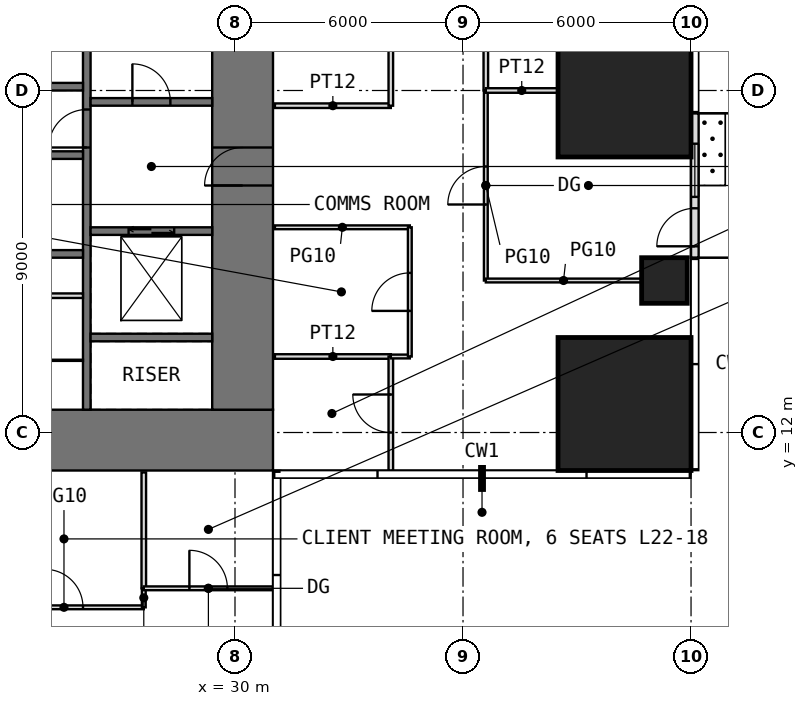
"""IFC4 building model, lengths in metres.
Left out: names, types, materials, properties, quantities, classifications, styles, units other than length and angle.
Written with IfcOpenShell. Run it as: python <this file> out.ifc"""

import sys

from ifc_helpers import new_model, si_unit, direction, frame, frame_2d, origin, origin_2d, place, context, subcontext, project, spatial, rectangle, extrude, element, fill, save


model = new_model("IFC4")
c1 = context("Model", 3, precision=1e-05, world=origin(), true_north=direction((0.0, 1.0)))
c2 = subcontext(c1, "Body", "Model", "MODEL_VIEW")
j1 = project(units=[si_unit("LENGTHUNIT", "METRE"), si_unit("PLANEANGLEUNIT", "RADIAN")], contexts=[c1])
p1 = place(None, origin())
s1 = spatial("IfcSite", under=j1, at=p1, CompositionType="ELEMENT")
p2 = place(p1, origin())
s2 = spatial("IfcBuilding", under=s1, at=p2, CompositionType="ELEMENT")
p3 = place(p2, frame((0.0, 0.0, 96.5)))
s3 = spatial("IfcBuildingStorey", under=s2, at=p3, CompositionType="ELEMENT", Elevation=96.5)
p4 = place(p3, frame((40.25, 12.75, 0.0), z_axis=(0.0, 0.0, 1.0), x_axis=(1.0, 0.0, 0.0)))
e1 = element("IfcColumn", 1, at=p4, inside=s3, PredefinedType="COLUMN", context=c2, shape_type="SweptSolid", body=[
    extrude(rectangle(XDim=3.5, YDim=3.5, at=origin_2d()), origin(), (0.0, 0.0, 1.0), 4.0),
])
p5 = place(p3, frame((41.3, 16.0, 0.0), z_axis=(0.0, 0.0, 1.0), x_axis=(1.0, 0.0, 0.0)))
e2 = element("IfcColumn", 2, at=p5, inside=s3, PredefinedType="COLUMN", context=c2, shape_type="SweptSolid", body=[
    extrude(rectangle(XDim=1.2, YDim=1.2, at=origin_2d()), origin(), (0.0, 0.0, 1.0), 4.0),
])
p6 = place(p3, frame((40.25, 21.0, 0.0), z_axis=(0.0, 0.0, 1.0), x_axis=(1.0, 0.0, 0.0)))
e3 = element("IfcColumn", 3, at=p6, inside=s3, PredefinedType="COLUMN", context=c2, shape_type="SweptSolid", body=[
    extrude(rectangle(XDim=3.5, YDim=3.5, at=origin_2d()), origin(), (0.0, 0.0, 1.0), 4.0),
])
p7 = place(p3, frame((42.1, 16.6, 0.0), z_axis=(0.0, 0.0, 1.0), x_axis=(0.0, 1.0, 0.0)))
e4 = element("IfcWall", 4, at=p7, inside=s3, PredefinedType="USERDEFINED", context=c2, shape_type="SweptSolid", body=[
    extrude(rectangle(XDim=3.8, YDim=0.2, at=frame_2d((1.9, 0.0))), origin(), (0.0, 0.0, 1.0), 3.75),
])
p8 = place(p7, frame((0.3, 0.0, 0.0)))
e5 = element("IfcOpeningElement", 5, at=p8, cuts=e4, PredefinedType="OPENING", context=c2, shape_type="SweptSolid", body=[
    extrude(rectangle(XDim=1.0, YDim=2.4, at=frame_2d((0.5, 1.2))), frame((0.0, 0.11, 0.0), z_axis=(0.0, -1.0, 0.0), x_axis=(1.0, 0.0, 0.0)), (0.0, 0.0, 1.0), 0.22),
])
p9 = place(p7, frame((1.6, 0.0, 0.3)))
e6 = element("IfcOpeningElement", 6, at=p9, cuts=e4, PredefinedType="OPENING", context=c2, shape_type="SweptSolid", body=[
    extrude(rectangle(XDim=1.4, YDim=2.7, at=frame_2d((0.7, 1.35))), frame((0.0, 0.11, 0.0), z_axis=(0.0, -1.0, 0.0), x_axis=(1.0, 0.0, 0.0)), (0.0, 0.0, 1.0), 0.22),
])
p10 = place(p3, frame((11.0, 11.8, -0.05), z_axis=(0.0, 0.0, 1.0), x_axis=(1.0, 0.0, 0.0)))
e7 = element("IfcWall", 7, at=p10, inside=s3, PredefinedType="SHEAR", context=c2, shape_type="SweptSolid", body=[
    extrude(rectangle(XDim=20.0, YDim=1.6, at=frame_2d((10.0, 0.0))), origin(), (0.0, 0.0, 1.0), 4.0),
])
p11 = place(p10, frame((9.0, 0.0, 0.05)))
e8 = element("IfcOpeningElement", 8, at=p11, cuts=e7, PredefinedType="OPENING", context=c2, shape_type="SweptSolid", body=[
    extrude(rectangle(XDim=2.0, YDim=2.2, at=frame_2d((1.0, 1.1))), frame((0.0, 0.81, 0.0), z_axis=(0.0, -1.0, 0.0), x_axis=(1.0, 0.0, 0.0)), (0.0, 0.0, 1.0), 1.62),
])
p12 = place(p3, frame((30.2, 12.6, -0.05), z_axis=(0.0, 0.0, 1.0), x_axis=(0.0, 1.0, 0.0)))
e9 = element("IfcWall", 9, at=p12, inside=s3, PredefinedType="SHEAR", context=c2, shape_type="SweptSolid", body=[
    extrude(rectangle(XDim=16.8, YDim=1.6, at=frame_2d((8.4, 0.0))), origin(), (0.0, 0.0, 1.0), 4.0),
])
p13 = place(p12, frame((5.9, 0.0, 0.05)))
e10 = element("IfcOpeningElement", 10, at=p13, cuts=e9, PredefinedType="OPENING", context=c2, shape_type="SweptSolid", body=[
    extrude(rectangle(XDim=1.0, YDim=2.2, at=frame_2d((0.5, 1.1))), frame((0.0, 0.81, 0.0), z_axis=(0.0, -1.0, 0.0), x_axis=(1.0, 0.0, 0.0)), (0.0, 0.0, 1.0), 1.62),
])
p14 = place(p3, frame((26.1, 12.6, -0.05), z_axis=(0.0, 0.0, 1.0), x_axis=(0.0, 1.0, 0.0)))
e11 = element("IfcWall", 11, at=p14, inside=s3, PredefinedType="SHEAR", context=c2, shape_type="SweptSolid", body=[
    extrude(rectangle(XDim=16.8, YDim=0.2, at=frame_2d((8.4, 0.0))), origin(), (0.0, 0.0, 1.0), 4.0),
])
p15 = place(p14, frame((6.9, 0.0, 0.05)))
e12 = element("IfcOpeningElement", 12, at=p15, cuts=e11, PredefinedType="OPENING", context=c2, shape_type="SweptSolid", body=[
    extrude(rectangle(XDim=1.0, YDim=2.2, at=frame_2d((0.5, 1.1))), frame((0.0, 0.11, 0.0), z_axis=(0.0, -1.0, 0.0), x_axis=(1.0, 0.0, 0.0)), (0.0, 0.0, 1.0), 0.22),
])
for number, where, z_axis, x_axis in (
    (13, (22.8, 16.7, -0.05), (0.0, 0.0, 1.0), (1.0, 0.0, 0.0)),
    (14, (22.8, 19.3, -0.05), (0.0, 0.0, 1.0), (1.0, 0.0, 0.0)),
    (15, (22.8, 21.1, -0.05), (0.0, 0.0, 1.0), (1.0, 0.0, 0.0)),
    (16, (26.2, 14.5, -0.05), (0.0, 0.0, 1.0), (1.0, 0.0, 0.0)),
):
    element("IfcWall", number, at=place(p3, frame(where, z_axis=z_axis, x_axis=x_axis)), inside=s3, PredefinedType="SHEAR", context=c2, shape_type="SweptSolid", body=[
        extrude(rectangle(XDim=3.2, YDim=0.2, at=frame_2d((1.6, 0.0))), origin(), (0.0, 0.0, 1.0), 4.0),
    ])
p16 = place(p3, frame((26.2, 17.3, -0.05), z_axis=(0.0, 0.0, 1.0), x_axis=(1.0, 0.0, 0.0)))
e17 = element("IfcWall", 17, at=p16, inside=s3, PredefinedType="SHEAR", context=c2, shape_type="SweptSolid", body=[
    extrude(rectangle(XDim=3.2, YDim=0.2, at=frame_2d((1.6, 0.0))), origin(), (0.0, 0.0, 1.0), 4.0),
])
p17 = place(p16, frame((1.0, 0.0, 0.05)))
e18 = element("IfcOpeningElement", 18, at=p17, cuts=e17, PredefinedType="OPENING", context=c2, shape_type="SweptSolid", body=[
    extrude(rectangle(XDim=1.2, YDim=2.2, at=frame_2d((0.6, 1.1))), frame((0.0, 0.11, 0.0), z_axis=(0.0, -1.0, 0.0), x_axis=(1.0, 0.0, 0.0)), (0.0, 0.0, 1.0), 0.22),
])
p18 = place(p3, frame((26.2, 20.7, -0.05), z_axis=(0.0, 0.0, 1.0), x_axis=(1.0, 0.0, 0.0)))
e19 = element("IfcWall", 19, at=p18, inside=s3, PredefinedType="SHEAR", context=c2, shape_type="SweptSolid", body=[
    extrude(rectangle(XDim=3.2, YDim=0.2, at=frame_2d((1.6, 0.0))), origin(), (0.0, 0.0, 1.0), 4.0),
])
p19 = place(p18, frame((1.1, 0.0, 0.05)))
e20 = element("IfcOpeningElement", 20, at=p19, cuts=e19, PredefinedType="OPENING", context=c2, shape_type="SweptSolid", body=[
    extrude(rectangle(XDim=1.0, YDim=2.2, at=frame_2d((0.5, 1.1))), frame((0.0, 0.11, 0.0), z_axis=(0.0, -1.0, 0.0), x_axis=(1.0, 0.0, 0.0)), (0.0, 0.0, 1.0), 0.22),
])
p20 = place(p3, frame((22.8, 15.6, 0.0), z_axis=(0.0, 0.0, 1.0), x_axis=(1.0, 0.0, 0.0)))
e21 = element("IfcWall", 21, at=p20, inside=s3, PredefinedType="PARTITIONING", context=c2, shape_type="SweptSolid", body=[
    extrude(rectangle(XDim=3.2, YDim=0.12, at=frame_2d((1.6, 0.0))), origin(), (0.0, 0.0, 1.0), 3.75),
])
p21 = place(p3, frame((24.6, 13.9, 0.0), z_axis=(0.0, 0.0, 1.0), x_axis=(1.0, 0.0, 0.0)))
e22 = element("IfcWall", 22, at=p21, inside=s3, PredefinedType="PARTITIONING", context=c2, shape_type="SweptSolid", body=[
    extrude(rectangle(XDim=1.4, YDim=0.03, at=frame_2d((0.7, 0.0))), origin(), (0.0, 0.0, 1.0), 3.75),
])
p22 = place(p3, frame((23.4, 7.4, 0.0), z_axis=(0.0, 0.0, 1.0), x_axis=(1.0, 0.0, 0.0)))
e23 = element("IfcWall", 23, at=p22, inside=s3, PredefinedType="PARTITIONING", context=c2, shape_type="SweptSolid", body=[
    extrude(rectangle(XDim=4.2, YDim=0.1, at=frame_2d((2.1, 0.0))), origin(), (0.0, 0.0, 1.0), 3.75),
])
p23 = place(p22, frame((1.6, 0.0, 0.0)))
e24 = element("IfcOpeningElement", 24, at=p23, cuts=e23, PredefinedType="OPENING", context=c2, shape_type="SweptSolid", body=[
    extrude(rectangle(XDim=1.0, YDim=2.4, at=frame_2d((0.5, 1.2))), frame((0.0, 0.06, 0.0), z_axis=(0.0, -1.0, 0.0), x_axis=(1.0, 0.0, 0.0)), (0.0, 0.0, 1.0), 0.12),
])
p24 = place(p3, frame((27.6, 7.4, 0.0), z_axis=(0.0, 0.0, 1.0), x_axis=(0.0, 1.0, 0.0)))
e25 = element("IfcWall", 25, at=p24, inside=s3, PredefinedType="PARTITIONING", context=c2, shape_type="SweptSolid", body=[
    extrude(rectangle(XDim=0.5, YDim=0.1, at=frame_2d((0.25, 0.0))), origin(), (0.0, 0.0, 1.0), 3.75),
])
p25 = place(p3, frame((27.6, 7.9, 0.0), z_axis=(0.0, 0.0, 1.0), x_axis=(0.0, 1.0, 0.0)))
e26 = element("IfcWall", 26, at=p25, inside=s3, PredefinedType="PARTITIONING", context=c2, shape_type="SweptSolid", body=[
    extrude(rectangle(XDim=3.05, YDim=0.12, at=frame_2d((1.525, 0.0))), origin(), (0.0, 0.0, 1.0), 3.75),
])
p26 = place(p3, frame((27.6, 7.9, 0.0), z_axis=(0.0, 0.0, 1.0), x_axis=(1.0, 0.0, 0.0)))
e27 = element("IfcWall", 27, at=p26, inside=s3, PredefinedType="PARTITIONING", context=c2, shape_type="SweptSolid", body=[
    extrude(rectangle(XDim=3.4, YDim=0.1, at=frame_2d((1.7, 0.0))), origin(), (0.0, 0.0, 1.0), 3.75),
])
p27 = place(p26, frame((1.2, 0.0, 0.0)))
e28 = element("IfcOpeningElement", 28, at=p27, cuts=e27, PredefinedType="OPENING", context=c2, shape_type="SweptSolid", body=[
    extrude(rectangle(XDim=1.0, YDim=2.4, at=frame_2d((0.5, 1.2))), frame((0.0, 0.06, 0.0), z_axis=(0.0, -1.0, 0.0), x_axis=(1.0, 0.0, 0.0)), (0.0, 0.0, 1.0), 0.12),
])
p28 = place(p3, frame((31.05, 14.0, 0.0), z_axis=(0.0, 0.0, 1.0), x_axis=(1.0, 0.0, 0.0)))
e29 = element("IfcWall", 29, at=p28, inside=s3, PredefinedType="PARTITIONING", context=c2, shape_type="SweptSolid", body=[
    extrude(rectangle(XDim=3.05, YDim=0.12, at=frame_2d((1.525, 0.0))), origin(), (0.0, 0.0, 1.0), 3.75),
])
p29 = place(p3, frame((31.05, 17.4, 0.0), z_axis=(0.0, 0.0, 1.0), x_axis=(1.0, 0.0, 0.0)))
e30 = element("IfcWall", 30, at=p29, inside=s3, PredefinedType="PARTITIONING", context=c2, shape_type="SweptSolid", body=[
    extrude(rectangle(XDim=3.55, YDim=0.1, at=frame_2d((1.775, 0.0))), origin(), (0.0, 0.0, 1.0), 3.75),
])
p30 = place(p3, frame((31.05, 20.6, 0.0), z_axis=(0.0, 0.0, 1.0), x_axis=(1.0, 0.0, 0.0)))
e31 = element("IfcWall", 31, at=p30, inside=s3, PredefinedType="PARTITIONING", context=c2, shape_type="SweptSolid", body=[
    extrude(rectangle(XDim=3.05, YDim=0.12, at=frame_2d((1.525, 0.0))), origin(), (0.0, 0.0, 1.0), 3.75),
])
p31 = place(p3, frame((34.1, 11.0, 0.0), z_axis=(0.0, 0.0, 1.0), x_axis=(0.0, 1.0, 0.0)))
e32 = element("IfcWall", 32, at=p31, inside=s3, PredefinedType="PARTITIONING", context=c2, shape_type="SweptSolid", body=[
    extrude(rectangle(XDim=3.0, YDim=0.12, at=frame_2d((1.5, 0.0))), origin(), (0.0, 0.0, 1.0), 3.75),
])
p32 = place(p31, frame((1.0, 0.0, 0.0)))
e33 = element("IfcOpeningElement", 33, at=p32, cuts=e32, PredefinedType="OPENING", context=c2, shape_type="SweptSolid", body=[
    extrude(rectangle(XDim=1.0, YDim=2.2, at=frame_2d((0.5, 1.1))), frame((0.0, 0.07, 0.0), z_axis=(0.0, -1.0, 0.0), x_axis=(1.0, 0.0, 0.0)), (0.0, 0.0, 1.0), 0.14),
])
p33 = place(p3, frame((34.1, 14.0, 0.0), z_axis=(0.0, 0.0, 1.0), x_axis=(1.0, 0.0, 0.0)))
e34 = element("IfcWall", 34, at=p33, inside=s3, PredefinedType="PARTITIONING", context=c2, shape_type="SweptSolid", body=[
    extrude(rectangle(XDim=0.5, YDim=0.1, at=frame_2d((0.25, 0.0))), origin(), (0.0, 0.0, 1.0), 3.75),
])
p34 = place(p3, frame((34.1, 20.6, 0.0), z_axis=(0.0, 0.0, 1.0), x_axis=(0.0, 1.0, 0.0)))
e35 = element("IfcWall", 35, at=p34, inside=s3, PredefinedType="PARTITIONING", context=c2, shape_type="SweptSolid", body=[
    extrude(rectangle(XDim=5.2, YDim=0.12, at=frame_2d((2.6, 0.0))), origin(), (0.0, 0.0, 1.0), 3.75),
])
p35 = place(p34, frame((2.1, 0.0, 0.0)))
e36 = element("IfcOpeningElement", 36, at=p35, cuts=e35, PredefinedType="OPENING", context=c2, shape_type="SweptSolid", body=[
    extrude(rectangle(XDim=1.0, YDim=2.2, at=frame_2d((0.5, 1.1))), frame((0.0, 0.07, 0.0), z_axis=(0.0, -1.0, 0.0), x_axis=(1.0, 0.0, 0.0)), (0.0, 0.0, 1.0), 0.14),
])
p36 = place(p3, frame((34.6, 14.0, 0.0), z_axis=(0.0, 0.0, 1.0), x_axis=(0.0, 1.0, 0.0)))
e37 = element("IfcWall", 37, at=p36, inside=s3, PredefinedType="PARTITIONING", context=c2, shape_type="SweptSolid", body=[
    extrude(rectangle(XDim=3.4, YDim=0.1, at=frame_2d((1.7, 0.0))), origin(), (0.0, 0.0, 1.0), 3.75),
])
p37 = place(p36, frame((1.2, 0.0, 0.0)))
e38 = element("IfcOpeningElement", 38, at=p37, cuts=e37, PredefinedType="OPENING", context=c2, shape_type="SweptSolid", body=[
    extrude(rectangle(XDim=1.0, YDim=2.4, at=frame_2d((0.5, 1.2))), frame((0.0, 0.06, 0.0), z_axis=(0.0, -1.0, 0.0), x_axis=(1.0, 0.0, 0.0)), (0.0, 0.0, 1.0), 0.12),
])
p38 = place(p3, frame((36.6, 16.0, 0.0), z_axis=(0.0, 0.0, 1.0), x_axis=(0.0, 1.0, 0.0)))
e39 = element("IfcWall", 39, at=p38, inside=s3, PredefinedType="PARTITIONING", context=c2, shape_type="SweptSolid", body=[
    extrude(rectangle(XDim=5.0, YDim=0.1, at=frame_2d((2.5, 0.0))), origin(), (0.0, 0.0, 1.0), 3.75),
])
p39 = place(p38, frame((2.0, 0.0, 0.0)))
e40 = element("IfcOpeningElement", 40, at=p39, cuts=e39, PredefinedType="OPENING", context=c2, shape_type="SweptSolid", body=[
    extrude(rectangle(XDim=1.0, YDim=2.4, at=frame_2d((0.5, 1.2))), frame((0.0, 0.06, 0.0), z_axis=(0.0, -1.0, 0.0), x_axis=(1.0, 0.0, 0.0)), (0.0, 0.0, 1.0), 0.12),
])
p40 = place(p3, frame((36.6, 16.0, 0.0), z_axis=(0.0, 0.0, 1.0), x_axis=(1.0, 0.0, 0.0)))
e41 = element("IfcWall", 41, at=p40, inside=s3, PredefinedType="PARTITIONING", context=c2, shape_type="SweptSolid", body=[
    extrude(rectangle(XDim=4.09, YDim=0.1, at=frame_2d((2.045, 0.0))), origin(), (0.0, 0.0, 1.0), 3.75),
])
p41 = place(p3, frame((36.6, 21.0, 0.0), z_axis=(0.0, 0.0, 1.0), x_axis=(0.0, 1.0, 0.0)))
e42 = element("IfcWall", 42, at=p41, inside=s3, PredefinedType="PARTITIONING", context=c2, shape_type="SweptSolid", body=[
    extrude(rectangle(XDim=5.0, YDim=0.12, at=frame_2d((2.5, 0.0))), origin(), (0.0, 0.0, 1.0), 3.75),
])
p42 = place(p41, frame((2.0, 0.0, 0.0)))
e43 = element("IfcOpeningElement", 43, at=p42, cuts=e42, PredefinedType="OPENING", context=c2, shape_type="SweptSolid", body=[
    extrude(rectangle(XDim=1.0, YDim=2.2, at=frame_2d((0.5, 1.1))), frame((0.0, 0.07, 0.0), z_axis=(0.0, -1.0, 0.0), x_axis=(1.0, 0.0, 0.0)), (0.0, 0.0, 1.0), 0.14),
])
p43 = place(p3, frame((36.6, 21.0, 0.0), z_axis=(0.0, 0.0, 1.0), x_axis=(1.0, 0.0, 0.0)))
e44 = element("IfcWall", 44, at=p43, inside=s3, PredefinedType="PARTITIONING", context=c2, shape_type="SweptSolid", body=[
    extrude(rectangle(XDim=1.89, YDim=0.12, at=frame_2d((0.945, 0.0))), origin(), (0.0, 0.0, 1.0), 3.75),
])
p44 = place(p8, origin())
e45 = element("IfcDoor", 45, at=p44, inside=s3, OperationType="SINGLE_SWING_LEFT", PredefinedType="DOOR", context=c2, shape_type="SweptSolid", body=[
    extrude(rectangle(XDim=1.0, YDim=2.4, at=frame_2d((0.5, 1.2))), frame((0.0, 0.025, 0.0), z_axis=(0.0, -1.0, 0.0), x_axis=(1.0, 0.0, 0.0)), (0.0, 0.0, 1.0), 0.05),
])
fill(e5, e45)
p45 = place(p9, origin())
e46 = element("IfcWindow", 46, at=p45, inside=s3, PartitioningType="SINGLE_PANEL", PredefinedType="WINDOW", context=c2, shape_type="SweptSolid", body=[
    extrude(rectangle(XDim=1.4, YDim=2.7, at=frame_2d((0.7, 1.35))), frame((0.0, 0.03, 0.0), z_axis=(0.0, -1.0, 0.0), x_axis=(1.0, 0.0, 0.0)), (0.0, 0.0, 1.0), 0.06),
])
fill(e6, e46)
p46 = place(p13, origin())
e47 = element("IfcDoor", 47, at=p46, inside=s3, OperationType="SINGLE_SWING_LEFT", PredefinedType="DOOR", context=c2, shape_type="SweptSolid", body=[
    extrude(rectangle(XDim=1.0, YDim=2.2, at=frame_2d((0.5, 1.1))), frame((0.0, 0.025, 0.0), z_axis=(0.0, -1.0, 0.0), x_axis=(1.0, 0.0, 0.0)), (0.0, 0.0, 1.0), 0.05),
])
fill(e10, e47)
p47 = place(p19, origin())
e48 = element("IfcDoor", 48, at=p47, inside=s3, OperationType="SINGLE_SWING_LEFT", PredefinedType="DOOR", context=c2, shape_type="SweptSolid", body=[
    extrude(rectangle(XDim=1.0, YDim=2.2, at=frame_2d((0.5, 1.1))), frame((0.0, 0.025, 0.0), z_axis=(0.0, -1.0, 0.0), x_axis=(1.0, 0.0, 0.0)), (0.0, 0.0, 1.0), 0.05),
])
fill(e20, e48)
p48 = place(p15, origin())
e49 = element("IfcDoor", 49, at=p48, inside=s3, OperationType="SINGLE_SWING_LEFT", PredefinedType="DOOR", context=c2, shape_type="SweptSolid", body=[
    extrude(rectangle(XDim=1.0, YDim=2.2, at=frame_2d((0.5, 1.1))), frame((0.0, 0.025, 0.0), z_axis=(0.0, -1.0, 0.0), x_axis=(1.0, 0.0, 0.0)), (0.0, 0.0, 1.0), 0.05),
])
fill(e12, e49)
p49 = place(p23, origin())
e50 = element("IfcDoor", 50, at=p49, inside=s3, OperationType="SINGLE_SWING_LEFT", PredefinedType="DOOR", context=c2, shape_type="SweptSolid", body=[
    extrude(rectangle(XDim=1.0, YDim=2.4, at=frame_2d((0.5, 1.2))), frame((0.0, 0.025, 0.0), z_axis=(0.0, -1.0, 0.0), x_axis=(1.0, 0.0, 0.0)), (0.0, 0.0, 1.0), 0.05),
])
fill(e24, e50)
p50 = place(p27, origin())
e51 = element("IfcDoor", 51, at=p50, inside=s3, OperationType="SINGLE_SWING_LEFT", PredefinedType="DOOR", context=c2, shape_type="SweptSolid", body=[
    extrude(rectangle(XDim=1.0, YDim=2.4, at=frame_2d((0.5, 1.2))), frame((0.0, 0.025, 0.0), z_axis=(0.0, -1.0, 0.0), x_axis=(1.0, 0.0, 0.0)), (0.0, 0.0, 1.0), 0.05),
])
fill(e28, e51)
p51 = place(p32, origin())
e52 = element("IfcDoor", 52, at=p51, inside=s3, OperationType="SINGLE_SWING_RIGHT", PredefinedType="DOOR", context=c2, shape_type="SweptSolid", body=[
    extrude(rectangle(XDim=1.0, YDim=2.2, at=frame_2d((0.5, 1.1))), frame((0.0, 0.025, 0.0), z_axis=(0.0, -1.0, 0.0), x_axis=(1.0, 0.0, 0.0)), (0.0, 0.0, 1.0), 0.05),
])
fill(e33, e52)
p52 = place(p37, origin())
e53 = element("IfcDoor", 53, at=p52, inside=s3, OperationType="SINGLE_SWING_LEFT", PredefinedType="DOOR", context=c2, shape_type="SweptSolid", body=[
    extrude(rectangle(XDim=1.0, YDim=2.4, at=frame_2d((0.5, 1.2))), frame((0.0, 0.025, 0.0), z_axis=(0.0, -1.0, 0.0), x_axis=(1.0, 0.0, 0.0)), (0.0, 0.0, 1.0), 0.05),
])
fill(e38, e53)
p53 = place(p39, origin())
e54 = element("IfcDoor", 54, at=p53, inside=s3, OperationType="SINGLE_SWING_LEFT", PredefinedType="DOOR", context=c2, shape_type="SweptSolid", body=[
    extrude(rectangle(XDim=1.0, YDim=2.4, at=frame_2d((0.5, 1.2))), frame((0.0, 0.025, 0.0), z_axis=(0.0, -1.0, 0.0), x_axis=(1.0, 0.0, 0.0)), (0.0, 0.0, 1.0), 0.05),
])
fill(e40, e54)
p54 = place(p17, origin())
e55 = element("IfcDoor", 55, at=p54, inside=s3, OperationType="DOUBLE_DOOR_SLIDING", PredefinedType="DOOR", context=c2, shape_type="SweptSolid", body=[
    extrude(rectangle(XDim=1.2, YDim=2.2, at=frame_2d((0.6, 1.1))), frame((0.0, 0.025, 0.0), z_axis=(0.0, -1.0, 0.0), x_axis=(1.0, 0.0, 0.0)), (0.0, 0.0, 1.0), 0.05),
])
fill(e18, e55)
save(model, sys.argv[1])
